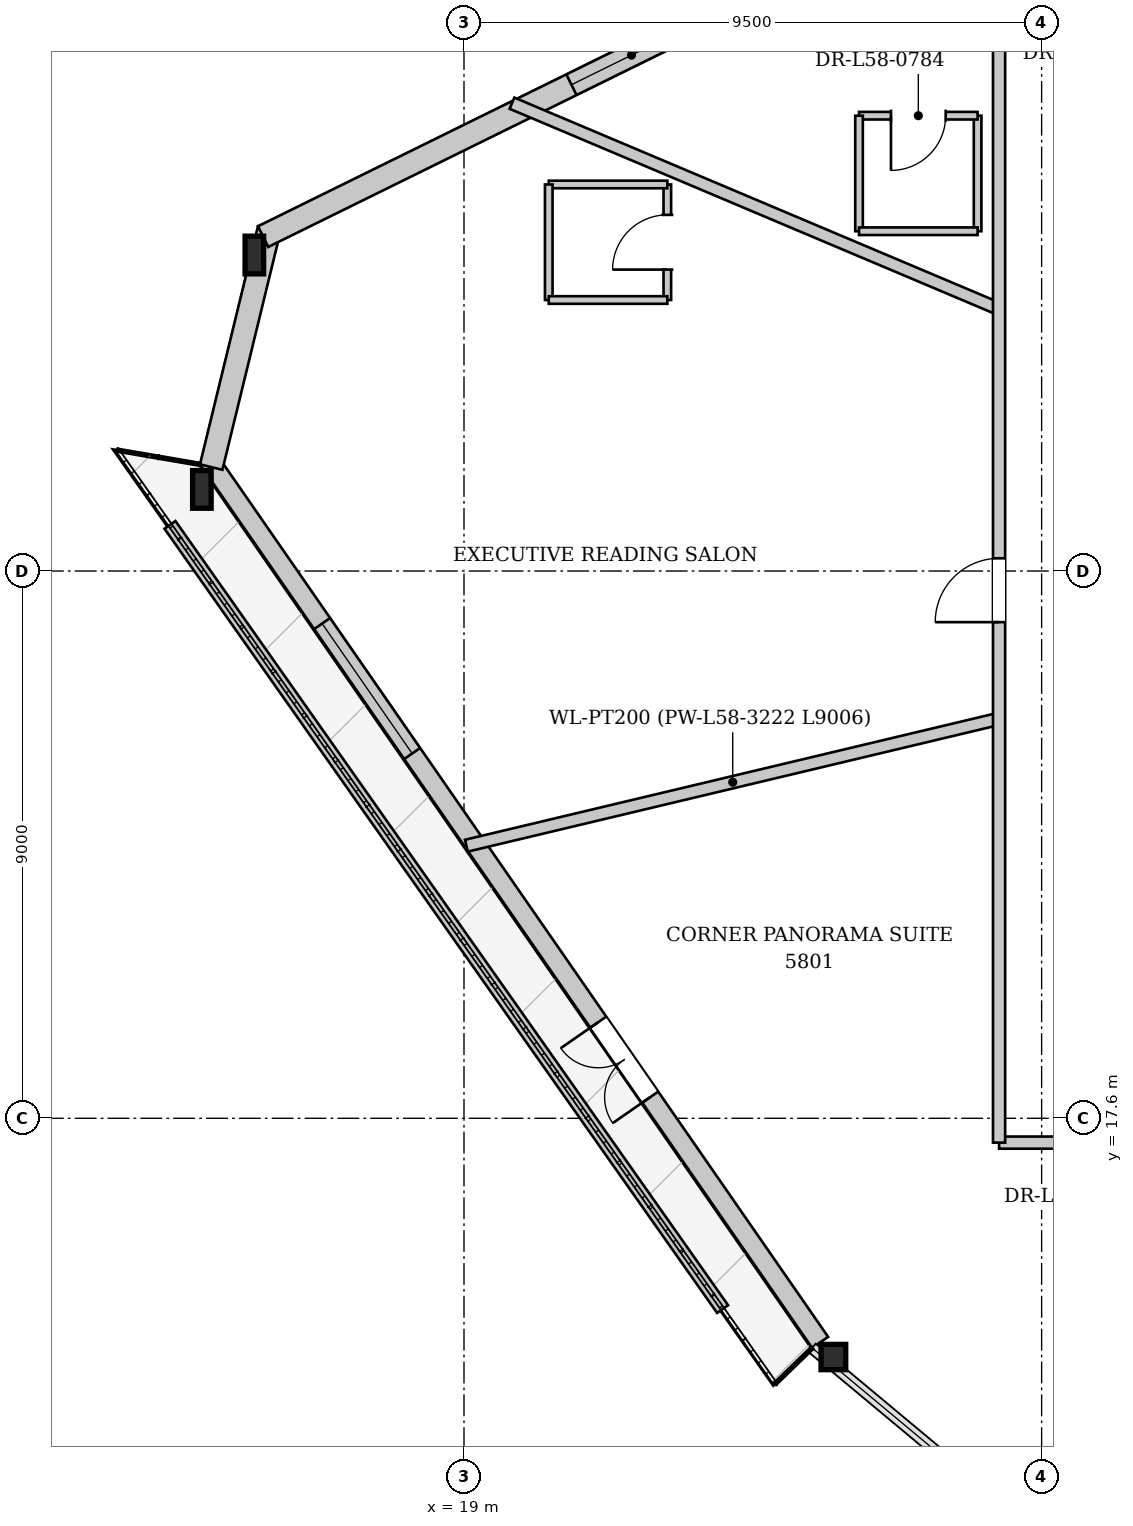
"""IFC4 building model, lengths in metres.
Left out: names, types, materials, properties, quantities, classifications, styles, units other than length and angle.
Written with IfcOpenShell. Run it as: python <this file> out.ifc"""

import sys

from ifc_helpers import new_model, si_unit, direction, frame, frame_2d, origin, origin_2d, place, context, subcontext, project, spatial, rectangle, i_section, extrude, source, transform, mapped, element, fill, save


model = new_model("IFC4")
c1 = context("Model", 3, precision=1e-05, world=origin(), true_north=direction((0.0, 1.0)))
c2 = subcontext(c1, "Body", "Model", "MODEL_VIEW")
j1 = project(units=[si_unit("LENGTHUNIT", "METRE"), si_unit("PLANEANGLEUNIT", "RADIAN")], contexts=[c1])
p1 = place(None, origin())
s1 = spatial("IfcSite", under=j1, at=p1, CompositionType="ELEMENT")
p2 = place(p1, origin())
s2 = spatial("IfcBuilding", under=s1, at=p2, CompositionType="ELEMENT")
p3 = place(p2, frame((0.0, 0.0, 220.25)))
s3 = spatial("IfcBuildingStorey", under=s2, at=p3, CompositionType="ELEMENT", Elevation=220.25)
m1 = source(origin(), c2, "Body", "SweptSolid", [
    extrude(i_section(OverallWidth=0.305, OverallDepth=0.62, WebThickness=0.021, FlangeThickness=0.04, at=origin_2d()), origin(), (0.0, 0.0, 1.0), 3.517),
])
p4 = place(p3, frame((15.612, 32.27, 0.0), z_axis=(-0.034293514834, -0.269072193314, 0.962509277683), x_axis=(0.991975750475, -0.126428281923, 0.0)))
e1 = element("IfcColumn", 1, at=p4, inside=s3, PredefinedType="COLUMN", context=c2, shape_type="MappedRepresentation", body=[
    mapped(m1, transform((0.0, 0.0, 0.0), x_axis=(1.0, 0.0, 0.0), y_axis=(0.0, 1.0, 0.0), z_axis=(0.0, 0.0, 1.0), scale=1.0)),
])
m2 = source(origin(), c2, "Body", "SweptSolid", [
    extrude(i_section(OverallWidth=0.305, OverallDepth=0.62, WebThickness=0.021, FlangeThickness=0.04, at=origin_2d()), origin(), (0.0, 0.0, 1.0), 3.484),
])
p5 = place(p3, frame((14.658, 28.354, 0.0), z_axis=(0.017867277816, -0.236408609218, 0.971489438888), x_axis=(0.997156164078, 0.075363017736, 0.0)))
e2 = element("IfcColumn", 2, at=p5, inside=s3, PredefinedType="COLUMN", context=c2, shape_type="MappedRepresentation", body=[
    mapped(m2, transform((0.0, 0.0, 0.0), x_axis=(1.0, 0.0, 0.0), y_axis=(0.0, 1.0, 0.0), z_axis=(0.0, 0.0, 1.0), scale=1.0)),
])
m3 = source(origin(), c2, "Body", "SweptSolid", [
    extrude(i_section(OverallWidth=0.406, OverallDepth=0.416, WebThickness=0.027, FlangeThickness=0.042, at=origin_2d()), origin(), (0.0, 0.0, 1.0), 3.469),
])
p6 = place(p3, frame((24.726, 13.823, 0.0), z_axis=(0.201474528412, -0.086064739172, 0.975705321843), x_axis=(0.392833572911, 0.919609582374, 0.0)))
e3 = element("IfcColumn", 3, at=p6, inside=s3, PredefinedType="COLUMN", context=c2, shape_type="MappedRepresentation", body=[
    mapped(m3, transform((0.0, 0.0, 0.0), x_axis=(1.0, 0.0, 0.0), y_axis=(0.0, 1.0, 0.0), z_axis=(0.0, 0.0, 1.0), scale=1.0)),
])
p7 = place(p3, frame((24.857, 13.914, 0.0), z_axis=(0.0, 0.0, 1.0), x_axis=(-0.569497917595, 0.821992774819, 0.0)))
e4 = element("IfcWall", 4, at=p7, inside=s3, PredefinedType="SOLIDWALL", context=c2, shape_type="SweptSolid", body=[
    extrude(rectangle(XDim=17.678, YDim=0.32, at=frame_2d((8.839, 0.0))), origin(), (0.0, 0.0, 1.0), 2.822),
])
p8 = place(p7, frame((4.907, 0.0, 0.0)))
e5 = element("IfcOpeningElement", 5, at=p8, cuts=e4, PredefinedType="OPENING", context=c2, shape_type="SweptSolid", body=[
    extrude(rectangle(XDim=1.5, YDim=2.3, at=frame_2d((0.75, 1.15))), frame((0.0, 0.17, 0.0), z_axis=(0.0, -1.0, 0.0), x_axis=(1.0, 0.0, 0.0)), (0.0, 0.0, 1.0), 0.34),
])
p9 = place(p7, frame((11.782, 0.0, 0.352)))
e6 = element("IfcOpeningElement", 6, at=p9, cuts=e4, PredefinedType="OPENING", context=c2, shape_type="SweptSolid", body=[
    extrude(rectangle(XDim=2.6, YDim=2.35, at=frame_2d((1.3, 1.175))), frame((0.0, 0.17, 0.0), z_axis=(0.0, -1.0, 0.0), x_axis=(1.0, 0.0, 0.0)), (0.0, 0.0, 1.0), 0.34),
])
p10 = place(p3, frame((14.843, 28.31, 0.0), z_axis=(0.0, 0.0, 1.0), x_axis=(0.236815318431, 0.971554684491, 0.0)))
e7 = element("IfcWall", 7, at=p10, inside=s3, PredefinedType="SOLIDWALL", context=c2, shape_type="SweptSolid", body=[
    extrude(rectangle(XDim=4.03, YDim=0.38, at=frame_2d((2.015, 0.0))), origin(), (0.0, 0.0, 1.0), 2.822),
])
p11 = place(p3, frame((15.696, 32.1, 0.0), z_axis=(0.0, 0.0, 1.0), x_axis=(0.89709423073, 0.441839270766, 0.0)))
e8 = element("IfcWall", 8, at=p11, inside=s3, PredefinedType="SOLIDWALL", context=c2, shape_type="SweptSolid", body=[
    extrude(rectangle(XDim=22.511, YDim=0.38, at=frame_2d((11.255, 0.0))), origin(), (0.0, 0.0, 1.0), 2.822),
])
p12 = place(p11, frame((5.653, 0.0, 0.452)))
e9 = element("IfcOpeningElement", 9, at=p12, cuts=e8, PredefinedType="OPENING", context=c2, shape_type="SweptSolid", body=[
    extrude(rectangle(XDim=2.2, YDim=2.25, at=frame_2d((1.1, 1.125))), frame((0.0, 0.2, 0.0), z_axis=(0.0, -1.0, 0.0), x_axis=(1.0, 0.0, 0.0)), (0.0, 0.0, 1.0), 0.4),
])
p13 = place(p11, frame((15.108, 0.0, 0.452)))
e10 = element("IfcOpeningElement", 10, at=p13, cuts=e8, PredefinedType="OPENING", context=c2, shape_type="SweptSolid", body=[
    extrude(rectangle(XDim=2.2, YDim=2.25, at=frame_2d((1.1, 1.125))), frame((0.0, 0.2, 0.0), z_axis=(0.0, -1.0, 0.0), x_axis=(1.0, 0.0, 0.0)), (0.0, 0.0, 1.0), 0.4),
])
p14 = place(p3, frame((14.164, 27.359, 0.0), z_axis=(0.0, 0.0, 1.0), x_axis=(0.576040252734, -0.817421327854, 0.0)))
e11 = element("IfcWall", 11, at=p14, inside=s3, PredefinedType="PARAPET", context=c2, shape_type="SweptSolid", body=[
    extrude(rectangle(XDim=15.777, YDim=0.22, at=frame_2d((7.889, 0.0))), origin(), (0.0, 0.0, 1.0), 0.3),
])
p15 = place(p3, frame((27.8, 24.17, 0.0), z_axis=(0.0, 0.0, 1.0), x_axis=(-0.972779156476, -0.231734142339, 0.0)))
e12 = element("IfcWall", 12, at=p15, inside=s3, PredefinedType="PARTITIONING", context=c2, shape_type="SweptSolid", body=[
    extrude(rectangle(XDim=9.006, YDim=0.2, at=frame_2d((4.503, 0.0))), origin(), (0.0, 0.0, 1.0), 3.33),
])
p16 = place(p3, frame((27.8, 30.909, 0.0), z_axis=(0.0, 0.0, 1.0), x_axis=(-0.921162801318, 0.389177457553, 0.0)))
e13 = element("IfcWall", 13, at=p16, inside=s3, PredefinedType="PARTITIONING", context=c2, shape_type="SweptSolid", body=[
    extrude(rectangle(XDim=8.697, YDim=0.2, at=frame_2d((4.348, 0.0))), origin(), (0.0, 0.0, 1.0), 3.33),
])
p17 = place(p3, frame((27.447, 32.188, 0.0), z_axis=(0.0, 0.0, 1.0), x_axis=(0.0, 1.0, 0.0)))
e14 = element("IfcWall", 14, at=p17, inside=s3, PredefinedType="PARTITIONING", context=c2, shape_type="SweptSolid", body=[
    extrude(rectangle(XDim=1.9, YDim=0.125, at=frame_2d((0.95, 0.0))), origin(), (0.0, 0.0, 1.0), 3.33),
])
p18 = place(p3, frame((27.447, 34.088, 0.0), z_axis=(0.0, 0.0, 1.0), x_axis=(-1.0, 0.0, 0.0)))
e15 = element("IfcWall", 15, at=p18, inside=s3, PredefinedType="PARTITIONING", context=c2, shape_type="SweptSolid", body=[
    extrude(rectangle(XDim=1.95, YDim=0.125, at=frame_2d((0.975, 0.0))), origin(), (0.0, 0.0, 1.0), 3.33),
])
p19 = place(p18, frame((0.525, 0.0, 0.0)))
e16 = element("IfcOpeningElement", 16, at=p19, cuts=e15, PredefinedType="OPENING", context=c2, shape_type="SweptSolid", body=[
    extrude(rectangle(XDim=0.9, YDim=2.1, at=frame_2d((0.45, 1.05))), frame((0.0, 0.073, 0.0), z_axis=(0.0, -1.0, 0.0), x_axis=(1.0, 0.0, 0.0)), (0.0, 0.0, 1.0), 0.145),
])
p20 = place(p3, frame((25.497, 34.088, 0.0), z_axis=(0.0, 0.0, 1.0), x_axis=(0.0, -1.0, 0.0)))
e17 = element("IfcWall", 17, at=p20, inside=s3, PredefinedType="PARTITIONING", context=c2, shape_type="SweptSolid", body=[
    extrude(rectangle(XDim=1.9, YDim=0.125, at=frame_2d((0.95, 0.0))), origin(), (0.0, 0.0, 1.0), 3.33),
])
p21 = place(p3, frame((25.497, 32.188, 0.0), z_axis=(0.0, 0.0, 1.0), x_axis=(1.0, 0.0, 0.0)))
e18 = element("IfcWall", 18, at=p21, inside=s3, PredefinedType="PARTITIONING", context=c2, shape_type="SweptSolid", body=[
    extrude(rectangle(XDim=1.95, YDim=0.125, at=frame_2d((0.975, 0.0))), origin(), (0.0, 0.0, 1.0), 3.33),
])
p22 = place(p3, frame((22.344, 31.057, 0.0), z_axis=(0.0, 0.0, 1.0), x_axis=(0.0, 1.0, 0.0)))
e19 = element("IfcWall", 19, at=p22, inside=s3, PredefinedType="PARTITIONING", context=c2, shape_type="SweptSolid", body=[
    extrude(rectangle(XDim=1.9, YDim=0.125, at=frame_2d((0.95, 0.0))), origin(), (0.0, 0.0, 1.0), 3.33),
])
p23 = place(p22, frame((0.5, 0.0, 0.0)))
e20 = element("IfcOpeningElement", 20, at=p23, cuts=e19, PredefinedType="OPENING", context=c2, shape_type="SweptSolid", body=[
    extrude(rectangle(XDim=0.9, YDim=2.1, at=frame_2d((0.45, 1.05))), frame((0.0, 0.073, 0.0), z_axis=(0.0, -1.0, 0.0), x_axis=(1.0, 0.0, 0.0)), (0.0, 0.0, 1.0), 0.145),
])
p24 = place(p3, frame((22.344, 32.957, 0.0), z_axis=(0.0, 0.0, 1.0), x_axis=(-1.0, 0.0, 0.0)))
e21 = element("IfcWall", 21, at=p24, inside=s3, PredefinedType="PARTITIONING", context=c2, shape_type="SweptSolid", body=[
    extrude(rectangle(XDim=1.95, YDim=0.125, at=frame_2d((0.975, 0.0))), origin(), (0.0, 0.0, 1.0), 3.33),
])
p25 = place(p3, frame((20.394, 32.957, 0.0), z_axis=(0.0, 0.0, 1.0), x_axis=(0.0, -1.0, 0.0)))
e22 = element("IfcWall", 22, at=p25, inside=s3, PredefinedType="PARTITIONING", context=c2, shape_type="SweptSolid", body=[
    extrude(rectangle(XDim=1.9, YDim=0.125, at=frame_2d((0.95, 0.0))), origin(), (0.0, 0.0, 1.0), 3.33),
])
p26 = place(p3, frame((20.394, 31.057, 0.0), z_axis=(0.0, 0.0, 1.0), x_axis=(1.0, 0.0, 0.0)))
e23 = element("IfcWall", 23, at=p26, inside=s3, PredefinedType="PARTITIONING", context=c2, shape_type="SweptSolid", body=[
    extrude(rectangle(XDim=1.95, YDim=0.125, at=frame_2d((0.975, 0.0))), origin(), (0.0, 0.0, 1.0), 3.33),
])
p27 = place(p3, frame((27.8, 17.2, 0.0), z_axis=(0.0, 0.0, 1.0), x_axis=(1.0, 0.0, 0.0)))
e24 = element("IfcWall", 24, at=p27, inside=s3, PredefinedType="PARTITIONING", context=c2, shape_type="SweptSolid", body=[
    extrude(rectangle(XDim=20.4, YDim=0.2, at=frame_2d((10.2, 0.0))), origin(), (0.0, 0.0, 1.0), 3.33),
])
p28 = place(p27, frame((1.255, 0.0, 0.0)))
e25 = element("IfcOpeningElement", 25, at=p28, cuts=e24, PredefinedType="OPENING", context=c2, shape_type="SweptSolid", body=[
    extrude(rectangle(XDim=1.05, YDim=2.2, at=frame_2d((0.525, 1.1))), frame((0.0, 0.11, 0.0), z_axis=(0.0, -1.0, 0.0), x_axis=(1.0, 0.0, 0.0)), (0.0, 0.0, 1.0), 0.22),
])
p29 = place(p27, frame((11.764, 0.0, 0.0)))
e26 = element("IfcOpeningElement", 26, at=p29, cuts=e24, PredefinedType="OPENING", context=c2, shape_type="SweptSolid", body=[
    extrude(rectangle(XDim=1.05, YDim=2.2, at=frame_2d((0.525, 1.1))), frame((0.0, 0.11, 0.0), z_axis=(0.0, -1.0, 0.0), x_axis=(1.0, 0.0, 0.0)), (0.0, 0.0, 1.0), 0.22),
])
p30 = place(p3, frame((27.8, 17.2, 0.0), z_axis=(0.0, 0.0, 1.0), x_axis=(0.0, 1.0, 0.0)))
e27 = element("IfcWall", 27, at=p30, inside=s3, PredefinedType="PARTITIONING", context=c2, shape_type="SweptSolid", body=[
    extrude(rectangle(XDim=18.8, YDim=0.2, at=frame_2d((9.4, 0.0))), origin(), (0.0, 0.0, 1.0), 3.33),
])
p31 = place(p30, frame((8.559, 0.0, 0.0)))
e28 = element("IfcOpeningElement", 28, at=p31, cuts=e27, PredefinedType="OPENING", context=c2, shape_type="SweptSolid", body=[
    extrude(rectangle(XDim=1.05, YDim=2.2, at=frame_2d((0.525, 1.1))), frame((0.0, 0.11, 0.0), z_axis=(0.0, -1.0, 0.0), x_axis=(1.0, 0.0, 0.0)), (0.0, 0.0, 1.0), 0.22),
])
m4 = source(origin(), c2, "Body", "SweptSolid", [
    extrude(rectangle(XDim=1.5, YDim=2.3, at=frame_2d((0.75, 1.15))), frame((0.0, 0.025, 0.0), z_axis=(0.0, -1.0, 0.0), x_axis=(1.0, 0.0, 0.0)), (0.0, 0.0, 1.0), 0.05),
])
p32 = place(p8, origin())
e29 = element("IfcDoor", 29, at=p32, inside=s3, OperationType="DOUBLE_DOOR_SINGLE_SWING", PredefinedType="DOOR", context=c2, shape_type="MappedRepresentation", body=[
    mapped(m4, transform((0.0, 0.0, 0.0), x_axis=(1.0, 0.0, 0.0), y_axis=(0.0, 1.0, 0.0), z_axis=(0.0, 0.0, 1.0), scale=1.0)),
])
fill(e5, e29)
m5 = source(origin(), c2, "Body", "SweptSolid", [
    extrude(rectangle(XDim=2.6, YDim=2.35, at=frame_2d((1.3, 1.175))), frame((0.0, 0.03, 0.0), z_axis=(0.0, -1.0, 0.0), x_axis=(1.0, 0.0, 0.0)), (0.0, 0.0, 1.0), 0.06),
])
p33 = place(p9, origin())
e30 = element("IfcWindow", 30, at=p33, inside=s3, PartitioningType="SINGLE_PANEL", PredefinedType="WINDOW", context=c2, shape_type="MappedRepresentation", body=[
    mapped(m5, transform((0.0, 0.0, 0.0), x_axis=(1.0, 0.0, 0.0), y_axis=(0.0, 1.0, 0.0), z_axis=(0.0, 0.0, 1.0), scale=1.0)),
])
fill(e6, e30)
m6 = source(origin(), c2, "Body", "SweptSolid", [
    extrude(rectangle(XDim=2.2, YDim=2.25, at=frame_2d((1.1, 1.125))), frame((0.0, 0.03, 0.0), z_axis=(0.0, -1.0, 0.0), x_axis=(1.0, 0.0, 0.0)), (0.0, 0.0, 1.0), 0.06),
])
p34 = place(p12, origin())
e31 = element("IfcWindow", 31, at=p34, inside=s3, PartitioningType="SINGLE_PANEL", PredefinedType="WINDOW", context=c2, shape_type="MappedRepresentation", body=[
    mapped(m6, transform((0.0, 0.0, 0.0), x_axis=(1.0, 0.0, 0.0), y_axis=(0.0, 1.0, 0.0), z_axis=(0.0, 0.0, 1.0), scale=1.0)),
])
fill(e9, e31)
m7 = source(origin(), c2, "Body", "SweptSolid", [
    extrude(rectangle(XDim=0.9, YDim=2.1, at=frame_2d((0.45, 1.05))), frame((0.0, 0.025, 0.0), z_axis=(0.0, -1.0, 0.0), x_axis=(1.0, 0.0, 0.0)), (0.0, 0.0, 1.0), 0.05),
])
p35 = place(p19, origin())
e32 = element("IfcDoor", 32, at=p35, inside=s3, OperationType="SINGLE_SWING_RIGHT", PredefinedType="DOOR", context=c2, shape_type="MappedRepresentation", body=[
    mapped(m7, transform((0.0, 0.0, 0.0), x_axis=(1.0, 0.0, 0.0), y_axis=(0.0, 1.0, 0.0), z_axis=(0.0, 0.0, 1.0), scale=1.0)),
])
fill(e16, e32)
p36 = place(p23, origin())
e33 = element("IfcDoor", 33, at=p36, inside=s3, OperationType="SINGLE_SWING_LEFT", PredefinedType="DOOR", context=c2, shape_type="MappedRepresentation", body=[
    mapped(m7, transform((0.0, 0.0, 0.0), x_axis=(1.0, 0.0, 0.0), y_axis=(0.0, 1.0, 0.0), z_axis=(0.0, 0.0, 1.0), scale=1.0)),
])
fill(e20, e33)
m8 = source(origin(), c2, "Body", "SweptSolid", [
    extrude(rectangle(XDim=1.05, YDim=2.2, at=frame_2d((0.525, 1.1))), frame((0.0, 0.025, 0.0), z_axis=(0.0, -1.0, 0.0), x_axis=(1.0, 0.0, 0.0)), (0.0, 0.0, 1.0), 0.05),
])
p37 = place(p31, origin())
e34 = element("IfcDoor", 34, at=p37, inside=s3, OperationType="SINGLE_SWING_LEFT", PredefinedType="DOOR", context=c2, shape_type="MappedRepresentation", body=[
    mapped(m8, transform((0.0, 0.0, 0.0), x_axis=(1.0, 0.0, 0.0), y_axis=(0.0, 1.0, 0.0), z_axis=(0.0, 0.0, 1.0), scale=1.0)),
])
fill(e28, e34)
save(model, sys.argv[1])
